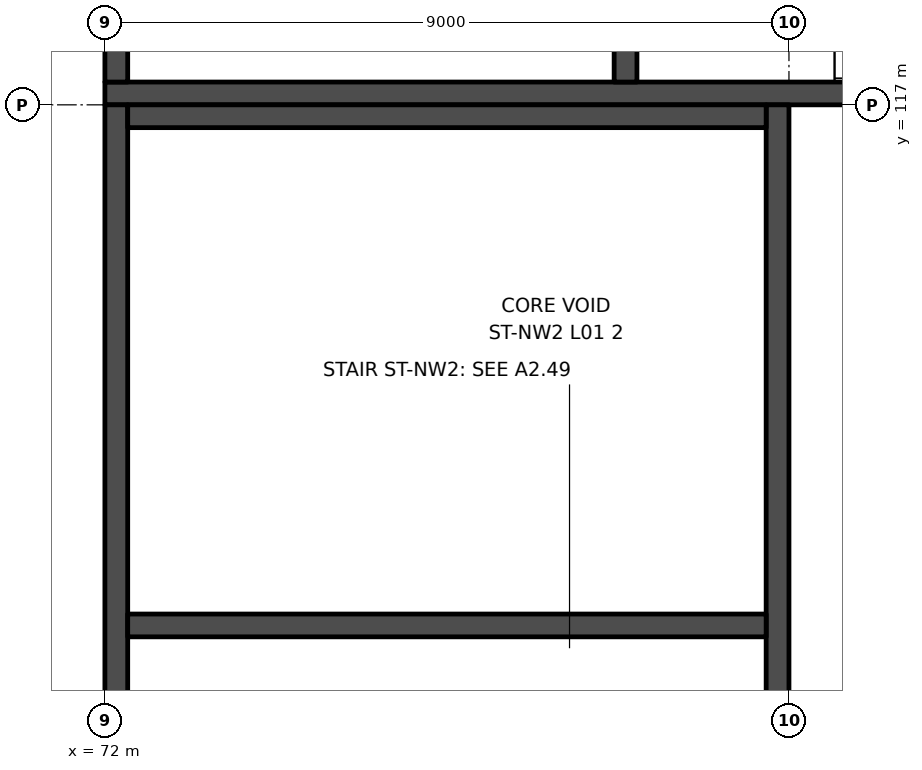
"""IFC4 building model, lengths in metres.
Left out: names, types, materials, properties, quantities, classifications, styles, units other than length and angle.
Written with IfcOpenShell. Run it as: python <this file> out.ifc"""

import sys

from ifc_helpers import new_model, si_unit, direction, frame, frame_2d, origin, place, context, subcontext, project, spatial, rectangle, extrude, element, save


model = new_model("IFC4")
c1 = context("Model", 3, precision=1e-05, world=origin(), true_north=direction((0.0, 1.0)))
c2 = subcontext(c1, "Body", "Model", "MODEL_VIEW")
j1 = project(units=[si_unit("LENGTHUNIT", "METRE"), si_unit("PLANEANGLEUNIT", "RADIAN")], contexts=[c1])
p1 = place(None, origin())
s1 = spatial("IfcSite", under=j1, at=p1, CompositionType="ELEMENT")
p2 = place(p1, origin())
s2 = spatial("IfcBuilding", under=s1, at=p2, CompositionType="ELEMENT")
p3 = place(p2, frame((0.0, 0.0, 7.0)))
s3 = spatial("IfcBuildingStorey", under=s2, at=p3, CompositionType="ELEMENT", Elevation=7.0)
p4 = place(p3, frame((90.25, 117.15, 0.0), z_axis=(0.0, 0.0, 1.0), x_axis=(-1.0, 0.0, 0.0)))
e1 = element("IfcWall", 1, at=p4, inside=s3, PredefinedType="SHEAR", context=c2, shape_type="SweptSolid", body=[
    extrude(rectangle(XDim=18.25, YDim=0.3, at=frame_2d((9.125, 0.0))), origin(), (0.0, 0.0, 1.0), 4.5),
])
p5 = place(p4, frame((1.75, 0.0, 0.0)))
e2 = element("IfcOpeningElement", 2, at=p5, cuts=e1, PredefinedType="OPENING", context=c2, shape_type="SweptSolid", body=[
    extrude(rectangle(XDim=1.2, YDim=2.1, at=frame_2d((0.6, 1.05))), frame((0.0, 0.16, 0.0), z_axis=(0.0, -1.0, 0.0), x_axis=(1.0, 0.0, 0.0)), (0.0, 0.0, 1.0), 0.32),
])
for number, where, z_axis, x_axis in (
    (3, (72.15, 117.3, 0.0), (0.0, 0.0, 1.0), (0.0, 1.0, 0.0)),
    (4, (78.85, 117.3, 0.0), (0.0, 0.0, 1.0), (0.0, 1.0, 0.0)),
):
    element("IfcWall", number, at=place(p3, frame(where, z_axis=z_axis, x_axis=x_axis)), inside=s3, PredefinedType="SHEAR", context=c2, shape_type="SweptSolid", body=[
        extrude(rectangle(XDim=8.4, YDim=0.3, at=frame_2d((4.2, 0.0))), origin(), (0.0, 0.0, 1.0), 4.5),
    ])
p6 = place(p3, frame((80.85, 99.0, 0.0), z_axis=(0.0, 0.0, 1.0), x_axis=(0.0, 1.0, 0.0)))
e5 = element("IfcWall", 5, at=p6, inside=s3, PredefinedType="SHEAR", context=c2, shape_type="SweptSolid", body=[
    extrude(rectangle(XDim=18.0, YDim=0.3, at=frame_2d((9.0, 0.0))), origin(), (0.0, 0.0, 1.0), 4.5),
])
p7 = place(p6, frame((1.5, 0.0, 0.0)))
e6 = element("IfcOpeningElement", 6, at=p7, cuts=e5, PredefinedType="OPENING", context=c2, shape_type="SweptSolid", body=[
    extrude(rectangle(XDim=1.2, YDim=2.1, at=frame_2d((0.6, 1.05))), frame((0.0, 0.16, 0.0), z_axis=(0.0, -1.0, 0.0), x_axis=(1.0, 0.0, 0.0)), (0.0, 0.0, 1.0), 0.32),
])
p8 = place(p3, frame((72.15, 99.0, 0.0), z_axis=(0.0, 0.0, 1.0), x_axis=(0.0, 1.0, 0.0)))
e7 = element("IfcWall", 7, at=p8, inside=s3, PredefinedType="SHEAR", context=c2, shape_type="SweptSolid", body=[
    extrude(rectangle(XDim=18.0, YDim=0.3, at=frame_2d((9.0, 0.0))), origin(), (0.0, 0.0, 1.0), 4.5),
])
for number, where, z_axis, x_axis in (
    (8, (80.7, 116.85, 0.0), (0.0, 0.0, 1.0), (-1.0, 0.0, 0.0)),
    (9, (80.7, 110.15, 0.0), (0.0, 0.0, 1.0), (-1.0, 0.0, 0.0)),
):
    element("IfcWall", number, at=place(p3, frame(where, z_axis=z_axis, x_axis=x_axis)), inside=s3, PredefinedType="SHEAR", context=c2, shape_type="SweptSolid", body=[
        extrude(rectangle(XDim=8.4, YDim=0.3, at=frame_2d((4.2, 0.0))), origin(), (0.0, 0.0, 1.0), 4.5),
    ])
save(model, sys.argv[1])
